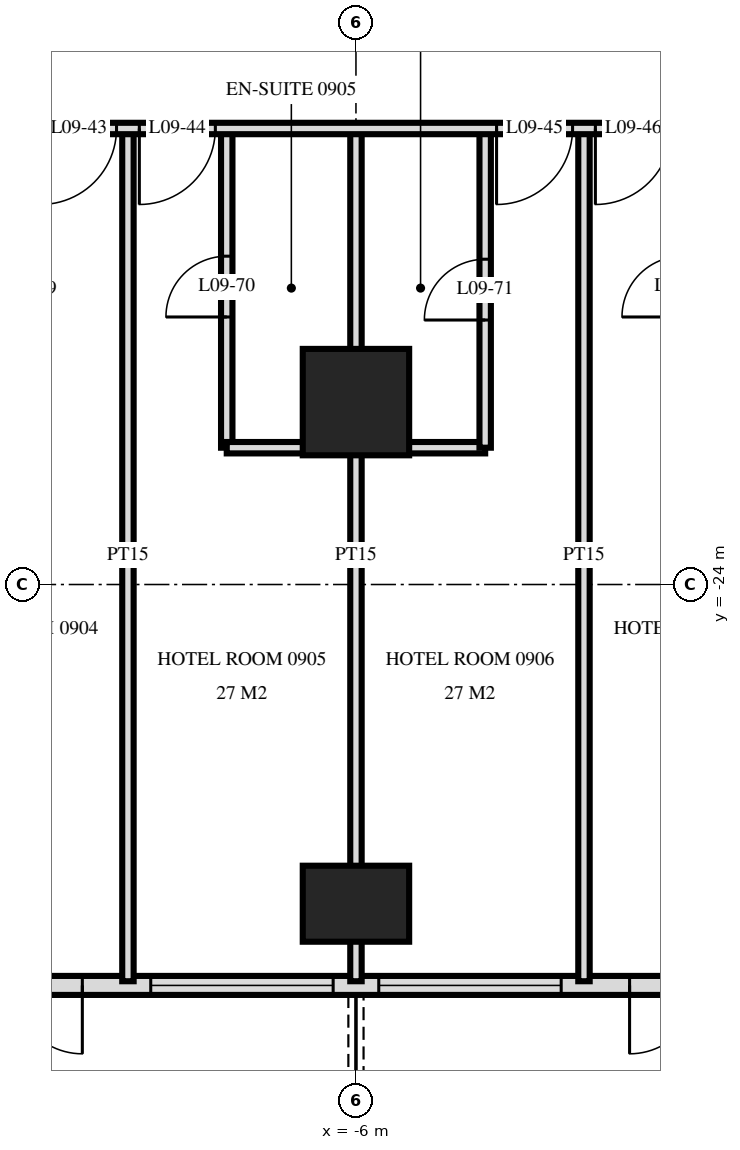
"""IFC4 building model, lengths in metres.
Left out: names, types, materials, properties, quantities, classifications, styles, units other than length and angle.
Written with IfcOpenShell. Run it as: python <this file> out.ifc"""

import sys

from ifc_helpers import new_model, si_unit, direction, frame, frame_2d, origin, origin_2d, place, context, subcontext, project, spatial, rectangle, extrude, element, fill, save


model = new_model("IFC4")
c1 = context("Model", 3, precision=1e-05, world=origin(), true_north=direction((0.0, 1.0)))
c2 = subcontext(c1, "Body", "Model", "MODEL_VIEW")
j1 = project(units=[si_unit("LENGTHUNIT", "METRE"), si_unit("PLANEANGLEUNIT", "RADIAN")], contexts=[c1])
p1 = place(None, origin())
s1 = spatial("IfcSite", under=j1, at=p1, CompositionType="ELEMENT")
p2 = place(p1, origin())
s2 = spatial("IfcBuilding", under=s1, at=p2, CompositionType="ELEMENT")
p3 = place(p2, frame((0.0, 0.0, 42.0)))
s3 = spatial("IfcBuildingStorey", under=s2, at=p3, CompositionType="ELEMENT", Elevation=42.0)
p4 = place(p3, frame((-6.0, -28.2, 0.0), z_axis=(0.0, 0.0, 1.0), x_axis=(1.0, 0.0, 0.0)))
e1 = element("IfcColumn", 1, at=p4, inside=s3, PredefinedType="COLUMN", context=c2, shape_type="SweptSolid", body=[
    extrude(rectangle(XDim=1.4, YDim=1.0, at=origin_2d()), origin(), (0.0, 0.0, 1.0), 3.6),
])
p5 = place(p3, frame((-6.0, -21.6, 0.0), z_axis=(0.0, 0.0, 1.0), x_axis=(1.0, 0.0, 0.0)))
e2 = element("IfcColumn", 2, at=p5, inside=s3, PredefinedType="COLUMN", context=c2, shape_type="SweptSolid", body=[
    extrude(rectangle(XDim=1.4, YDim=1.4, at=origin_2d()), origin(), (0.0, 0.0, 1.0), 3.6),
])
p6 = place(p3, frame((-28.775, -29.275, 0.0), z_axis=(0.0, 0.0, 1.0), x_axis=(1.0, 0.0, 0.0)))
e3 = element("IfcWall", 3, at=p6, inside=s3, PredefinedType="SOLIDWALL", context=c2, shape_type="SweptSolid", body=[
    extrude(rectangle(XDim=57.551, YDim=0.25, at=frame_2d((28.775, 0.0))), origin(), (0.0, 0.0, 1.0), 3.32),
])
p7 = place(p6, frame((0.575, 0.0, 0.0)))
e4 = element("IfcOpeningElement", 4, at=p7, cuts=e3, PredefinedType="OPENING", context=c2, shape_type="SweptSolid", body=[
    extrude(rectangle(XDim=1.8, YDim=2.4, at=frame_2d((0.9, 1.2))), frame((0.0, 0.135, 0.0), z_axis=(0.0, -1.0, 0.0), x_axis=(1.0, 0.0, 0.0)), (0.0, 0.0, 1.0), 0.27),
])
p8 = place(p6, frame((5.375, 0.0, 0.0)))
e5 = element("IfcOpeningElement", 5, at=p8, cuts=e3, PredefinedType="OPENING", context=c2, shape_type="SweptSolid", body=[
    extrude(rectangle(XDim=1.8, YDim=2.4, at=frame_2d((0.9, 1.2))), frame((0.0, 0.135, 0.0), z_axis=(0.0, -1.0, 0.0), x_axis=(1.0, 0.0, 0.0)), (0.0, 0.0, 1.0), 0.27),
])
p9 = place(p6, frame((8.075, 0.0, 0.3)))
e6 = element("IfcOpeningElement", 6, at=p9, cuts=e3, PredefinedType="OPENING", context=c2, shape_type="SweptSolid", body=[
    extrude(rectangle(XDim=2.4, YDim=2.1, at=frame_2d((1.2, 1.05))), frame((0.0, 0.135, 0.0), z_axis=(0.0, -1.0, 0.0), x_axis=(1.0, 0.0, 0.0)), (0.0, 0.0, 1.0), 0.27),
])
p10 = place(p6, frame((11.375, 0.0, 0.0)))
e7 = element("IfcOpeningElement", 7, at=p10, cuts=e3, PredefinedType="OPENING", context=c2, shape_type="SweptSolid", body=[
    extrude(rectangle(XDim=1.8, YDim=2.4, at=frame_2d((0.9, 1.2))), frame((0.0, 0.135, 0.0), z_axis=(0.0, -1.0, 0.0), x_axis=(1.0, 0.0, 0.0)), (0.0, 0.0, 1.0), 0.27),
])
p11 = place(p6, frame((14.075, 0.0, 0.3)))
e8 = element("IfcOpeningElement", 8, at=p11, cuts=e3, PredefinedType="OPENING", context=c2, shape_type="SweptSolid", body=[
    extrude(rectangle(XDim=2.4, YDim=2.1, at=frame_2d((1.2, 1.05))), frame((0.0, 0.135, 0.0), z_axis=(0.0, -1.0, 0.0), x_axis=(1.0, 0.0, 0.0)), (0.0, 0.0, 1.0), 0.27),
])
p12 = place(p6, frame((17.375, 0.0, 0.0)))
e9 = element("IfcOpeningElement", 9, at=p12, cuts=e3, PredefinedType="OPENING", context=c2, shape_type="SweptSolid", body=[
    extrude(rectangle(XDim=1.8, YDim=2.4, at=frame_2d((0.9, 1.2))), frame((0.0, 0.135, 0.0), z_axis=(0.0, -1.0, 0.0), x_axis=(1.0, 0.0, 0.0)), (0.0, 0.0, 1.0), 0.27),
])
p13 = place(p6, frame((20.075, 0.0, 0.3)))
e10 = element("IfcOpeningElement", 10, at=p13, cuts=e3, PredefinedType="OPENING", context=c2, shape_type="SweptSolid", body=[
    extrude(rectangle(XDim=2.4, YDim=2.1, at=frame_2d((1.2, 1.05))), frame((0.0, 0.135, 0.0), z_axis=(0.0, -1.0, 0.0), x_axis=(1.0, 0.0, 0.0)), (0.0, 0.0, 1.0), 0.27),
])
p14 = place(p6, frame((23.075, 0.0, 0.3)))
e11 = element("IfcOpeningElement", 11, at=p14, cuts=e3, PredefinedType="OPENING", context=c2, shape_type="SweptSolid", body=[
    extrude(rectangle(XDim=2.4, YDim=2.1, at=frame_2d((1.2, 1.05))), frame((0.0, 0.135, 0.0), z_axis=(0.0, -1.0, 0.0), x_axis=(1.0, 0.0, 0.0)), (0.0, 0.0, 1.0), 0.27),
])
p15 = place(p6, frame((26.375, 0.0, 0.0)))
e12 = element("IfcOpeningElement", 12, at=p15, cuts=e3, PredefinedType="OPENING", context=c2, shape_type="SweptSolid", body=[
    extrude(rectangle(XDim=1.8, YDim=2.4, at=frame_2d((0.9, 1.2))), frame((0.0, 0.135, 0.0), z_axis=(0.0, -1.0, 0.0), x_axis=(1.0, 0.0, 0.0)), (0.0, 0.0, 1.0), 0.27),
])
p16 = place(p6, frame((29.375, 0.0, 0.0)))
e13 = element("IfcOpeningElement", 13, at=p16, cuts=e3, PredefinedType="OPENING", context=c2, shape_type="SweptSolid", body=[
    extrude(rectangle(XDim=1.8, YDim=2.4, at=frame_2d((0.9, 1.2))), frame((0.0, 0.135, 0.0), z_axis=(0.0, -1.0, 0.0), x_axis=(1.0, 0.0, 0.0)), (0.0, 0.0, 1.0), 0.27),
])
p17 = place(p6, frame((32.075, 0.0, 0.3)))
e14 = element("IfcOpeningElement", 14, at=p17, cuts=e3, PredefinedType="OPENING", context=c2, shape_type="SweptSolid", body=[
    extrude(rectangle(XDim=2.4, YDim=2.1, at=frame_2d((1.2, 1.05))), frame((0.0, 0.135, 0.0), z_axis=(0.0, -1.0, 0.0), x_axis=(1.0, 0.0, 0.0)), (0.0, 0.0, 1.0), 0.27),
])
p18 = place(p6, frame((35.375, 0.0, 0.0)))
e15 = element("IfcOpeningElement", 15, at=p18, cuts=e3, PredefinedType="OPENING", context=c2, shape_type="SweptSolid", body=[
    extrude(rectangle(XDim=1.8, YDim=2.4, at=frame_2d((0.9, 1.2))), frame((0.0, 0.135, 0.0), z_axis=(0.0, -1.0, 0.0), x_axis=(1.0, 0.0, 0.0)), (0.0, 0.0, 1.0), 0.27),
])
p19 = place(p6, frame((38.075, 0.0, 0.3)))
e16 = element("IfcOpeningElement", 16, at=p19, cuts=e3, PredefinedType="OPENING", context=c2, shape_type="SweptSolid", body=[
    extrude(rectangle(XDim=2.4, YDim=2.1, at=frame_2d((1.2, 1.05))), frame((0.0, 0.135, 0.0), z_axis=(0.0, -1.0, 0.0), x_axis=(1.0, 0.0, 0.0)), (0.0, 0.0, 1.0), 0.27),
])
p20 = place(p6, frame((41.375, 0.0, 0.0)))
e17 = element("IfcOpeningElement", 17, at=p20, cuts=e3, PredefinedType="OPENING", context=c2, shape_type="SweptSolid", body=[
    extrude(rectangle(XDim=1.8, YDim=2.4, at=frame_2d((0.9, 1.2))), frame((0.0, 0.135, 0.0), z_axis=(0.0, -1.0, 0.0), x_axis=(1.0, 0.0, 0.0)), (0.0, 0.0, 1.0), 0.27),
])
p21 = place(p6, frame((44.075, 0.0, 0.3)))
e18 = element("IfcOpeningElement", 18, at=p21, cuts=e3, PredefinedType="OPENING", context=c2, shape_type="SweptSolid", body=[
    extrude(rectangle(XDim=2.4, YDim=2.1, at=frame_2d((1.2, 1.05))), frame((0.0, 0.135, 0.0), z_axis=(0.0, -1.0, 0.0), x_axis=(1.0, 0.0, 0.0)), (0.0, 0.0, 1.0), 0.27),
])
p22 = place(p6, frame((47.375, 0.0, 0.0)))
e19 = element("IfcOpeningElement", 19, at=p22, cuts=e3, PredefinedType="OPENING", context=c2, shape_type="SweptSolid", body=[
    extrude(rectangle(XDim=1.8, YDim=2.4, at=frame_2d((0.9, 1.2))), frame((0.0, 0.135, 0.0), z_axis=(0.0, -1.0, 0.0), x_axis=(1.0, 0.0, 0.0)), (0.0, 0.0, 1.0), 0.27),
])
p23 = place(p6, frame((50.075, 0.0, 0.3)))
e20 = element("IfcOpeningElement", 20, at=p23, cuts=e3, PredefinedType="OPENING", context=c2, shape_type="SweptSolid", body=[
    extrude(rectangle(XDim=2.4, YDim=2.1, at=frame_2d((1.2, 1.05))), frame((0.0, 0.135, 0.0), z_axis=(0.0, -1.0, 0.0), x_axis=(1.0, 0.0, 0.0)), (0.0, 0.0, 1.0), 0.27),
])
p24 = place(p6, frame((53.375, 0.0, 0.0)))
e21 = element("IfcOpeningElement", 21, at=p24, cuts=e3, PredefinedType="OPENING", context=c2, shape_type="SweptSolid", body=[
    extrude(rectangle(XDim=1.8, YDim=2.4, at=frame_2d((0.9, 1.2))), frame((0.0, 0.135, 0.0), z_axis=(0.0, -1.0, 0.0), x_axis=(1.0, 0.0, 0.0)), (0.0, 0.0, 1.0), 0.27),
])
p25 = place(p3, frame((-3.0, -29.22, 0.0), z_axis=(0.0, 0.0, 1.0), x_axis=(0.0, 1.0, 0.0)))
e22 = element("IfcWall", 22, at=p25, inside=s3, PredefinedType="PARTITIONING", context=c2, shape_type="SweptSolid", body=[
    extrude(rectangle(XDim=11.22, YDim=0.15, at=frame_2d((5.61, 0.0))), origin(), (0.0, 0.0, 1.0), 3.32),
])
p26 = place(p3, frame((-4.3, -22.2, 0.0), z_axis=(0.0, 0.0, 1.0), x_axis=(0.0, 1.0, 0.0)))
e23 = element("IfcWall", 23, at=p26, inside=s3, PredefinedType="PARTITIONING", context=c2, shape_type="SweptSolid", body=[
    extrude(rectangle(XDim=4.2, YDim=0.15, at=frame_2d((2.1, 0.0))), origin(), (0.0, 0.0, 1.0), 3.32),
])
p27 = place(p26, frame((1.68, 0.0, 0.0)))
e24 = element("IfcOpeningElement", 24, at=p27, cuts=e23, PredefinedType="OPENING", context=c2, shape_type="SweptSolid", body=[
    extrude(rectangle(XDim=0.8, YDim=2.1, at=frame_2d((0.4, 1.05))), frame((0.0, 0.085, 0.0), z_axis=(0.0, -1.0, 0.0), x_axis=(1.0, 0.0, 0.0)), (0.0, 0.0, 1.0), 0.17),
])
p28 = place(p3, frame((-6.0, -29.22, 0.0), z_axis=(0.0, 0.0, 1.0), x_axis=(0.0, 1.0, 0.0)))
e25 = element("IfcWall", 25, at=p28, inside=s3, PredefinedType="PARTITIONING", context=c2, shape_type="SweptSolid", body=[
    extrude(rectangle(XDim=11.22, YDim=0.15, at=frame_2d((5.61, 0.0))), origin(), (0.0, 0.0, 1.0), 3.32),
])
p29 = place(p3, frame((-7.7, -22.2, 0.0), z_axis=(0.0, 0.0, 1.0), x_axis=(0.0, 1.0, 0.0)))
e26 = element("IfcWall", 26, at=p29, inside=s3, PredefinedType="PARTITIONING", context=c2, shape_type="SweptSolid", body=[
    extrude(rectangle(XDim=4.2, YDim=0.15, at=frame_2d((2.1, 0.0))), origin(), (0.0, 0.0, 1.0), 3.32),
])
p30 = place(p29, frame((1.72, 0.0, 0.0)))
e27 = element("IfcOpeningElement", 27, at=p30, cuts=e26, PredefinedType="OPENING", context=c2, shape_type="SweptSolid", body=[
    extrude(rectangle(XDim=0.8, YDim=2.1, at=frame_2d((0.4, 1.05))), frame((0.0, 0.085, 0.0), z_axis=(0.0, -1.0, 0.0), x_axis=(1.0, 0.0, 0.0)), (0.0, 0.0, 1.0), 0.17),
])
p31 = place(p3, frame((-9.0, -29.22, 0.0), z_axis=(0.0, 0.0, 1.0), x_axis=(0.0, 1.0, 0.0)))
e28 = element("IfcWall", 28, at=p31, inside=s3, PredefinedType="PARTITIONING", context=c2, shape_type="SweptSolid", body=[
    extrude(rectangle(XDim=11.22, YDim=0.15, at=frame_2d((5.61, 0.0))), origin(), (0.0, 0.0, 1.0), 3.32),
])
p32 = place(p3, frame((-7.7, -22.2, 0.0), z_axis=(0.0, 0.0, 1.0), x_axis=(1.0, 0.0, 0.0)))
e29 = element("IfcWall", 29, at=p32, inside=s3, PredefinedType="PARTITIONING", context=c2, shape_type="SweptSolid", body=[
    extrude(rectangle(XDim=3.4, YDim=0.15, at=frame_2d((1.7, 0.0))), origin(), (0.0, 0.0, 1.0), 3.32),
])
p33 = place(p3, frame((-33.12, -18.0, 0.0), z_axis=(0.0, 0.0, 1.0), x_axis=(1.0, 0.0, 0.0)))
e30 = element("IfcWall", 30, at=p33, inside=s3, PredefinedType="PARTITIONING", context=c2, shape_type="SweptSolid", body=[
    extrude(rectangle(XDim=66.24, YDim=0.15, at=frame_2d((33.12, 0.0))), origin(), (0.0, 0.0, 1.0), 3.32),
])
p34 = place(p33, frame((12.27, 0.0, 0.0)))
e31 = element("IfcOpeningElement", 31, at=p34, cuts=e30, PredefinedType="OPENING", context=c2, shape_type="SweptSolid", body=[
    extrude(rectangle(XDim=1.0, YDim=2.1, at=frame_2d((0.5, 1.05))), frame((0.0, 0.085, 0.0), z_axis=(0.0, -1.0, 0.0), x_axis=(1.0, 0.0, 0.0)), (0.0, 0.0, 1.0), 0.17),
])
p35 = place(p33, frame((16.97, 0.0, 0.0)))
e32 = element("IfcOpeningElement", 32, at=p35, cuts=e30, PredefinedType="OPENING", context=c2, shape_type="SweptSolid", body=[
    extrude(rectangle(XDim=1.0, YDim=2.1, at=frame_2d((0.5, 1.05))), frame((0.0, 0.085, 0.0), z_axis=(0.0, -1.0, 0.0), x_axis=(1.0, 0.0, 0.0)), (0.0, 0.0, 1.0), 0.17),
])
p36 = place(p33, frame((18.27, 0.0, 0.0)))
e33 = element("IfcOpeningElement", 33, at=p36, cuts=e30, PredefinedType="OPENING", context=c2, shape_type="SweptSolid", body=[
    extrude(rectangle(XDim=1.0, YDim=2.1, at=frame_2d((0.5, 1.05))), frame((0.0, 0.085, 0.0), z_axis=(0.0, -1.0, 0.0), x_axis=(1.0, 0.0, 0.0)), (0.0, 0.0, 1.0), 0.17),
])
p37 = place(p33, frame((22.97, 0.0, 0.0)))
e34 = element("IfcOpeningElement", 34, at=p37, cuts=e30, PredefinedType="OPENING", context=c2, shape_type="SweptSolid", body=[
    extrude(rectangle(XDim=1.0, YDim=2.1, at=frame_2d((0.5, 1.05))), frame((0.0, 0.085, 0.0), z_axis=(0.0, -1.0, 0.0), x_axis=(1.0, 0.0, 0.0)), (0.0, 0.0, 1.0), 0.17),
])
p38 = place(p33, frame((24.27, 0.0, 0.0)))
e35 = element("IfcOpeningElement", 35, at=p38, cuts=e30, PredefinedType="OPENING", context=c2, shape_type="SweptSolid", body=[
    extrude(rectangle(XDim=1.0, YDim=2.1, at=frame_2d((0.5, 1.05))), frame((0.0, 0.085, 0.0), z_axis=(0.0, -1.0, 0.0), x_axis=(1.0, 0.0, 0.0)), (0.0, 0.0, 1.0), 0.17),
])
p39 = place(p33, frame((28.97, 0.0, 0.0)))
e36 = element("IfcOpeningElement", 36, at=p39, cuts=e30, PredefinedType="OPENING", context=c2, shape_type="SweptSolid", body=[
    extrude(rectangle(XDim=1.0, YDim=2.1, at=frame_2d((0.5, 1.05))), frame((0.0, 0.085, 0.0), z_axis=(0.0, -1.0, 0.0), x_axis=(1.0, 0.0, 0.0)), (0.0, 0.0, 1.0), 0.17),
])
p40 = place(p33, frame((30.27, 0.0, 0.0)))
e37 = element("IfcOpeningElement", 37, at=p40, cuts=e30, PredefinedType="OPENING", context=c2, shape_type="SweptSolid", body=[
    extrude(rectangle(XDim=1.0, YDim=2.1, at=frame_2d((0.5, 1.05))), frame((0.0, 0.085, 0.0), z_axis=(0.0, -1.0, 0.0), x_axis=(1.0, 0.0, 0.0)), (0.0, 0.0, 1.0), 0.17),
])
p41 = place(p33, frame((34.97, 0.0, 0.0)))
e38 = element("IfcOpeningElement", 38, at=p41, cuts=e30, PredefinedType="OPENING", context=c2, shape_type="SweptSolid", body=[
    extrude(rectangle(XDim=1.0, YDim=2.1, at=frame_2d((0.5, 1.05))), frame((0.0, 0.085, 0.0), z_axis=(0.0, -1.0, 0.0), x_axis=(1.0, 0.0, 0.0)), (0.0, 0.0, 1.0), 0.17),
])
p42 = place(p33, frame((37.27, 0.0, 0.0)))
e39 = element("IfcOpeningElement", 39, at=p42, cuts=e30, PredefinedType="OPENING", context=c2, shape_type="SweptSolid", body=[
    extrude(rectangle(XDim=1.0, YDim=2.1, at=frame_2d((0.5, 1.05))), frame((0.0, 0.085, 0.0), z_axis=(0.0, -1.0, 0.0), x_axis=(1.0, 0.0, 0.0)), (0.0, 0.0, 1.0), 0.17),
])
p43 = place(p33, frame((43.97, 0.0, 0.0)))
e40 = element("IfcOpeningElement", 40, at=p43, cuts=e30, PredefinedType="OPENING", context=c2, shape_type="SweptSolid", body=[
    extrude(rectangle(XDim=1.0, YDim=2.1, at=frame_2d((0.5, 1.05))), frame((0.0, 0.085, 0.0), z_axis=(0.0, -1.0, 0.0), x_axis=(1.0, 0.0, 0.0)), (0.0, 0.0, 1.0), 0.17),
])
p44 = place(p33, frame((45.27, 0.0, 0.0)))
e41 = element("IfcOpeningElement", 41, at=p44, cuts=e30, PredefinedType="OPENING", context=c2, shape_type="SweptSolid", body=[
    extrude(rectangle(XDim=1.0, YDim=2.1, at=frame_2d((0.5, 1.05))), frame((0.0, 0.085, 0.0), z_axis=(0.0, -1.0, 0.0), x_axis=(1.0, 0.0, 0.0)), (0.0, 0.0, 1.0), 0.17),
])
p45 = place(p33, frame((51.22, 0.0, 0.0)))
e42 = element("IfcOpeningElement", 42, at=p45, cuts=e30, PredefinedType="OPENING", context=c2, shape_type="SweptSolid", body=[
    extrude(rectangle(XDim=1.0, YDim=2.1, at=frame_2d((0.5, 1.05))), frame((0.0, 0.085, 0.0), z_axis=(0.0, -1.0, 0.0), x_axis=(1.0, 0.0, 0.0)), (0.0, 0.0, 1.0), 0.17),
])
p46 = place(p33, frame((54.27, 0.0, 0.0)))
e43 = element("IfcOpeningElement", 43, at=p46, cuts=e30, PredefinedType="OPENING", context=c2, shape_type="SweptSolid", body=[
    extrude(rectangle(XDim=1.0, YDim=2.1, at=frame_2d((0.5, 1.05))), frame((0.0, 0.085, 0.0), z_axis=(0.0, -1.0, 0.0), x_axis=(1.0, 0.0, 0.0)), (0.0, 0.0, 1.0), 0.17),
])
p47 = place(p33, frame((6.07, 0.0, 0.0)))
e44 = element("IfcOpeningElement", 44, at=p47, cuts=e30, PredefinedType="OPENING", context=c2, shape_type="SweptSolid", body=[
    extrude(rectangle(XDim=1.0, YDim=2.1, at=frame_2d((0.5, 1.05))), frame((0.0, 0.085, 0.0), z_axis=(0.0, -1.0, 0.0), x_axis=(1.0, 0.0, 0.0)), (0.0, 0.0, 1.0), 0.17),
])
p48 = place(p33, frame((63.37, 0.0, 0.0)))
e45 = element("IfcOpeningElement", 45, at=p48, cuts=e30, PredefinedType="OPENING", context=c2, shape_type="SweptSolid", body=[
    extrude(rectangle(XDim=1.0, YDim=2.1, at=frame_2d((0.5, 1.05))), frame((0.0, 0.085, 0.0), z_axis=(0.0, -1.0, 0.0), x_axis=(1.0, 0.0, 0.0)), (0.0, 0.0, 1.0), 0.17),
])
p49 = place(p12, frame((0.9, 0.0, 0.0), z_axis=(0.0, 0.0, 1.0), x_axis=(-1.0, 0.0, 0.0)))
e46 = element("IfcDoor", 46, at=p49, inside=s3, OperationType="DOUBLE_DOOR_SINGLE_SWING", PredefinedType="DOOR", context=c2, shape_type="SweptSolid", body=[
    extrude(rectangle(XDim=1.8, YDim=2.4, at=frame_2d((0.0, 1.2))), frame((0.0, -0.025, 0.0), z_axis=(0.0, 1.0, 0.0), x_axis=(-1.0, 0.0, 0.0)), (0.0, 0.0, 1.0), 0.05),
])
fill(e9, e46)
p50 = place(p13, origin())
e47 = element("IfcWindow", 47, at=p50, inside=s3, PartitioningType="SINGLE_PANEL", PredefinedType="WINDOW", context=c2, shape_type="SweptSolid", body=[
    extrude(rectangle(XDim=2.4, YDim=2.1, at=frame_2d((1.2, 1.05))), frame((0.0, 0.03, 0.0), z_axis=(0.0, -1.0, 0.0), x_axis=(1.0, 0.0, 0.0)), (0.0, 0.0, 1.0), 0.06),
])
fill(e10, e47)
p51 = place(p14, origin())
e48 = element("IfcWindow", 48, at=p51, inside=s3, PartitioningType="SINGLE_PANEL", PredefinedType="WINDOW", context=c2, shape_type="SweptSolid", body=[
    extrude(rectangle(XDim=2.4, YDim=2.1, at=frame_2d((1.2, 1.05))), frame((0.0, 0.03, 0.0), z_axis=(0.0, -1.0, 0.0), x_axis=(1.0, 0.0, 0.0)), (0.0, 0.0, 1.0), 0.06),
])
fill(e11, e48)
p52 = place(p15, frame((0.9, 0.0, 0.0), z_axis=(0.0, 0.0, 1.0), x_axis=(-1.0, 0.0, 0.0)))
e49 = element("IfcDoor", 49, at=p52, inside=s3, OperationType="DOUBLE_DOOR_SINGLE_SWING", PredefinedType="DOOR", context=c2, shape_type="SweptSolid", body=[
    extrude(rectangle(XDim=1.8, YDim=2.4, at=frame_2d((0.0, 1.2))), frame((0.0, -0.025, 0.0), z_axis=(0.0, 1.0, 0.0), x_axis=(-1.0, 0.0, 0.0)), (0.0, 0.0, 1.0), 0.05),
])
fill(e12, e49)
p53 = place(p37, frame((0.5, 0.0, 0.0), z_axis=(0.0, 0.0, 1.0), x_axis=(-1.0, 0.0, 0.0)))
e50 = element("IfcDoor", 50, at=p53, inside=s3, OperationType="SINGLE_SWING_LEFT", PredefinedType="DOOR", context=c2, shape_type="SweptSolid", body=[
    extrude(rectangle(XDim=1.0, YDim=2.1, at=frame_2d((0.0, 1.05))), frame((0.0, -0.025, 0.0), z_axis=(0.0, 1.0, 0.0), x_axis=(-1.0, 0.0, 0.0)), (0.0, 0.0, 1.0), 0.05),
])
fill(e34, e50)
p54 = place(p38, frame((0.5, 0.0, 0.0), z_axis=(0.0, 0.0, 1.0), x_axis=(-1.0, 0.0, 0.0)))
e51 = element("IfcDoor", 51, at=p54, inside=s3, OperationType="SINGLE_SWING_LEFT", PredefinedType="DOOR", context=c2, shape_type="SweptSolid", body=[
    extrude(rectangle(XDim=1.0, YDim=2.1, at=frame_2d((0.0, 1.05))), frame((0.0, -0.025, 0.0), z_axis=(0.0, 1.0, 0.0), x_axis=(-1.0, 0.0, 0.0)), (0.0, 0.0, 1.0), 0.05),
])
fill(e35, e51)
p55 = place(p39, frame((0.5, 0.0, 0.0), z_axis=(0.0, 0.0, 1.0), x_axis=(-1.0, 0.0, 0.0)))
e52 = element("IfcDoor", 52, at=p55, inside=s3, OperationType="SINGLE_SWING_LEFT", PredefinedType="DOOR", context=c2, shape_type="SweptSolid", body=[
    extrude(rectangle(XDim=1.0, YDim=2.1, at=frame_2d((0.0, 1.05))), frame((0.0, -0.025, 0.0), z_axis=(0.0, 1.0, 0.0), x_axis=(-1.0, 0.0, 0.0)), (0.0, 0.0, 1.0), 0.05),
])
fill(e36, e52)
p56 = place(p40, frame((0.5, 0.0, 0.0), z_axis=(0.0, 0.0, 1.0), x_axis=(-1.0, 0.0, 0.0)))
e53 = element("IfcDoor", 53, at=p56, inside=s3, OperationType="SINGLE_SWING_LEFT", PredefinedType="DOOR", context=c2, shape_type="SweptSolid", body=[
    extrude(rectangle(XDim=1.0, YDim=2.1, at=frame_2d((0.0, 1.05))), frame((0.0, -0.025, 0.0), z_axis=(0.0, 1.0, 0.0), x_axis=(-1.0, 0.0, 0.0)), (0.0, 0.0, 1.0), 0.05),
])
fill(e37, e53)
p57 = place(p30, origin())
e54 = element("IfcDoor", 54, at=p57, inside=s3, OperationType="SINGLE_SWING_RIGHT", PredefinedType="DOOR", context=c2, shape_type="SweptSolid", body=[
    extrude(rectangle(XDim=0.8, YDim=2.1, at=frame_2d((0.4, 1.05))), frame((0.0, 0.025, 0.0), z_axis=(0.0, -1.0, 0.0), x_axis=(1.0, 0.0, 0.0)), (0.0, 0.0, 1.0), 0.05),
])
fill(e27, e54)
p58 = place(p27, origin())
e55 = element("IfcDoor", 55, at=p58, inside=s3, OperationType="SINGLE_SWING_RIGHT", PredefinedType="DOOR", context=c2, shape_type="SweptSolid", body=[
    extrude(rectangle(XDim=0.8, YDim=2.1, at=frame_2d((0.4, 1.05))), frame((0.0, 0.025, 0.0), z_axis=(0.0, -1.0, 0.0), x_axis=(1.0, 0.0, 0.0)), (0.0, 0.0, 1.0), 0.05),
])
fill(e24, e55)
save(model, sys.argv[1])
